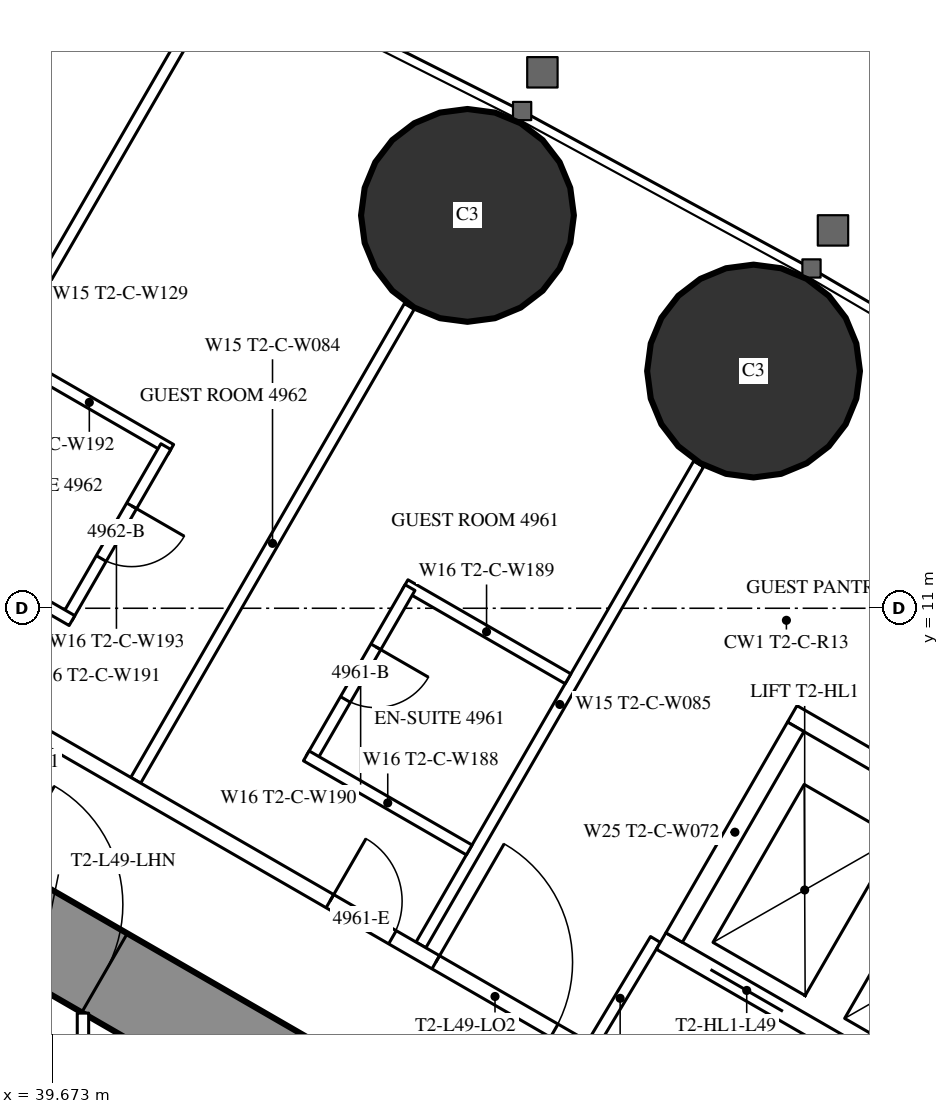
"""IFC4 building model, lengths in metres.
Left out: names, types, materials, properties, quantities, classifications, styles, units other than length and angle.
Written with IfcOpenShell. Run it as: python <this file> out.ifc"""

import sys

from ifc_helpers import new_model, si_unit, direction, frame, frame_2d, origin, origin_2d, place, context, subcontext, project, spatial, rectangle, circle, extrude, element, fill, save


model = new_model("IFC4")
c1 = context("Model", 3, precision=1e-05, world=origin(), true_north=direction((0.0, 1.0)))
c2 = subcontext(c1, "Body", "Model", "MODEL_VIEW")
j1 = project(units=[si_unit("LENGTHUNIT", "METRE"), si_unit("PLANEANGLEUNIT", "RADIAN")], contexts=[c1])
p1 = place(None, origin())
s1 = spatial("IfcSite", under=j1, at=p1, CompositionType="ELEMENT")
p2 = place(p1, origin())
s2 = spatial("IfcBuilding", under=s1, at=p2, CompositionType="ELEMENT")
p3 = place(p2, frame((0.0, 0.0, 184.3)))
s3 = spatial("IfcBuildingStorey", under=s2, at=p3, CompositionType="ELEMENT", Elevation=184.3)
for number, where, z_axis, x_axis in (
    (1, (48.897, 14.121, 0.0), (0.0, 0.0, 1.0), (1.0, 0.0, 0.0)),
    (2, (45.134, 16.168, 0.0), (0.0, 0.0, 1.0), (1.0, 0.0, 0.0)),
):
    element("IfcColumn", number, at=place(p3, frame(where, z_axis=z_axis, x_axis=x_axis)), inside=s3, PredefinedType="COLUMN", context=c2, shape_type="SweptSolid", body=[
        extrude(circle(Radius=1.4, at=origin_2d()), origin(), (0.0, 0.0, 1.0), 3.5),
    ])
p4 = place(p3, frame((27.2, 13.8, 0.0), z_axis=(0.0, 0.0, 1.0), x_axis=(0.866024515034, -0.500001539357, 0.0)))
e3 = element("IfcWall", 3, at=p4, inside=s3, PredefinedType="SHEAR", context=c2, shape_type="SweptSolid", body=[
    extrude(rectangle(XDim=26.907, YDim=1.2, at=frame_2d((13.454, 0.0))), origin(), (0.0, 0.0, 1.0), 3.5),
])
p5 = place(p4, frame((4.6, 0.0, 0.0)))
e4 = element("IfcOpeningElement", 4, at=p5, cuts=e3, PredefinedType="OPENING", context=c2, shape_type="SweptSolid", body=[
    extrude(rectangle(XDim=1.0, YDim=2.2, at=frame_2d((0.5, 1.1))), frame((0.0, 0.61, 0.0), z_axis=(0.0, -1.0, 0.0), x_axis=(1.0, 0.0, 0.0)), (0.0, 0.0, 1.0), 1.22),
])
p6 = place(p4, frame((13.395, 0.0, 0.0)))
e5 = element("IfcOpeningElement", 5, at=p6, cuts=e3, PredefinedType="OPENING", context=c2, shape_type="SweptSolid", body=[
    extrude(rectangle(XDim=1.8, YDim=2.2, at=frame_2d((0.9, 1.1))), frame((0.0, 0.61, 0.0), z_axis=(0.0, -1.0, 0.0), x_axis=(1.0, 0.0, 0.0)), (0.0, 0.0, 1.0), 1.22),
])
p7 = place(p3, frame((37.022, 10.9, 0.0), z_axis=(0.0, 0.0, 1.0), x_axis=(0.499998620953, 0.866026199976, 0.0)))
e6 = element("IfcWall", 6, at=p7, inside=s3, PredefinedType="PARTITIONING", context=c2, shape_type="SweptSolid", body=[
    extrude(rectangle(XDim=9.77, YDim=0.15, at=frame_2d((4.885, 0.0))), origin(), (0.0, 0.0, 1.0), 3.25),
])
p8 = place(p3, frame((40.769, 8.737, 0.0), z_axis=(0.0, 0.0, 1.0), x_axis=(0.500013115284, 0.866017831539, 0.0)))
e7 = element("IfcWall", 7, at=p8, inside=s3, PredefinedType="PARTITIONING", context=c2, shape_type="SweptSolid", body=[
    extrude(rectangle(XDim=7.198, YDim=0.15, at=frame_2d((3.599, 0.0))), origin(), (0.0, 0.0, 1.0), 2.3),
])
p9 = place(p3, frame((44.521, 6.571, 0.0), z_axis=(0.0, 0.0, 1.0), x_axis=(0.500020376429, 0.866013639128, 0.0)))
e8 = element("IfcWall", 8, at=p9, inside=s3, PredefinedType="PARTITIONING", context=c2, shape_type="SweptSolid", body=[
    extrude(rectangle(XDim=7.306, YDim=0.15, at=frame_2d((3.653, 0.0))), origin(), (0.0, 0.0, 1.0), 2.3),
])
p10 = place(p3, frame((27.959, 16.017, 0.0), z_axis=(0.0, 0.0, 1.0), x_axis=(0.866027146794, -0.499996981007, 0.0)))
e9 = element("IfcWall", 9, at=p10, inside=s3, PredefinedType="PARTITIONING", context=c2, shape_type="SweptSolid", body=[
    extrude(rectangle(XDim=21.657, YDim=0.2, at=frame_2d((10.829, 0.0))), origin(), (0.0, 0.0, 1.0), 3.25),
])
p11 = place(p10, frame((17.741, 0.0, 0.0)))
e10 = element("IfcOpeningElement", 10, at=p11, cuts=e9, PredefinedType="OPENING", context=c2, shape_type="SweptSolid", body=[
    extrude(rectangle(XDim=0.95, YDim=2.2, at=frame_2d((0.475, 1.1))), frame((0.0, 0.11, 0.0), z_axis=(0.0, -1.0, 0.0), x_axis=(1.0, 0.0, 0.0)), (0.0, 0.0, 1.0), 0.22),
])
p12 = place(p10, frame((10.782, 0.0, 0.0)))
e11 = element("IfcOpeningElement", 11, at=p12, cuts=e9, PredefinedType="OPENING", context=c2, shape_type="SweptSolid", body=[
    extrude(rectangle(XDim=0.95, YDim=2.2, at=frame_2d((0.475, 1.1))), frame((0.0, 0.11, 0.0), z_axis=(0.0, -1.0, 0.0), x_axis=(1.0, 0.0, 0.0)), (0.0, 0.0, 1.0), 0.22),
])
p13 = place(p10, frame((6.732, 0.0, 0.0)))
e12 = element("IfcOpeningElement", 12, at=p13, cuts=e9, PredefinedType="OPENING", context=c2, shape_type="SweptSolid", body=[
    extrude(rectangle(XDim=0.95, YDim=2.2, at=frame_2d((0.475, 1.1))), frame((0.0, 0.11, 0.0), z_axis=(0.0, -1.0, 0.0), x_axis=(1.0, 0.0, 0.0)), (0.0, 0.0, 1.0), 0.22),
])
p14 = place(p10, frame((19.349, 0.0, 0.0)))
e13 = element("IfcOpeningElement", 13, at=p14, cuts=e9, PredefinedType="OPENING", context=c2, shape_type="SweptSolid", body=[
    extrude(rectangle(XDim=1.8, YDim=2.2, at=frame_2d((0.9, 1.1))), frame((0.0, 0.11, 0.0), z_axis=(0.0, -1.0, 0.0), x_axis=(1.0, 0.0, 0.0)), (0.0, 0.0, 1.0), 0.22),
])
p15 = place(p3, frame((47.606, 6.643, 0.0), z_axis=(0.0, 0.0, 1.0), x_axis=(-0.514237157483, -0.857648031458, 0.0)))
e14 = element("IfcWall", 14, at=p15, inside=s3, PredefinedType="PARTITIONING", context=c2, shape_type="SweptSolid", body=[
    extrude(rectangle(XDim=1.805, YDim=0.15, at=frame_2d((0.902, 0.0))), origin(), (0.0, 0.0, 1.0), 3.25),
])
p16 = place(p3, frame((44.313, 11.31, 0.0), z_axis=(0.0, 0.0, 1.0), x_axis=(0.866031185235, -0.4999899861, 0.0)))
e15 = element("IfcWall", 15, at=p16, inside=s3, PredefinedType="PARTITIONING", context=c2, shape_type="SweptSolid", body=[
    extrude(rectangle(XDim=2.475, YDim=0.15, at=frame_2d((1.238, 0.0))), origin(), (0.0, 0.0, 1.0), 3.25),
])
p17 = place(p3, frame((43.078, 9.021, 0.0), z_axis=(0.0, 0.0, 1.0), x_axis=(0.49997716683, 0.86603858612, 0.0)))
e16 = element("IfcWall", 16, at=p17, inside=s3, PredefinedType="PARTITIONING", context=c2, shape_type="SweptSolid", body=[
    extrude(rectangle(XDim=2.6, YDim=0.15, at=frame_2d((1.3, 0.0))), origin(), (0.0, 0.0, 1.0), 3.25),
])
p18 = place(p17, frame((0.9, 0.0, 0.0)))
e17 = element("IfcOpeningElement", 17, at=p18, cuts=e16, PredefinedType="OPENING", context=c2, shape_type="SweptSolid", body=[
    extrude(rectangle(XDim=0.8, YDim=2.2, at=frame_2d((0.4, 1.1))), frame((0.0, 0.085, 0.0), z_axis=(0.0, -1.0, 0.0), x_axis=(1.0, 0.0, 0.0)), (0.0, 0.0, 1.0), 0.17),
])
p19 = place(p3, frame((43.013, 9.058, 0.0), z_axis=(0.0, 0.0, 1.0), x_axis=(0.866006523861, -0.500032699561, 0.0)))
e18 = element("IfcWall", 18, at=p19, inside=s3, PredefinedType="PARTITIONING", context=c2, shape_type="SweptSolid", body=[
    extrude(rectangle(XDim=2.475, YDim=0.15, at=frame_2d((1.237, 0.0))), origin(), (0.0, 0.0, 1.0), 2.45),
])
p20 = place(p3, frame((39.087, 14.327, 0.0), z_axis=(0.0, 0.0, 1.0), x_axis=(0.866006523861, -0.500032699561, 0.0)))
e19 = element("IfcWall", 19, at=p20, inside=s3, PredefinedType="PARTITIONING", context=c2, shape_type="SweptSolid", body=[
    extrude(rectangle(XDim=2.475, YDim=0.15, at=frame_2d((1.237, 0.0))), origin(), (0.0, 0.0, 1.0), 3.25),
])
p21 = place(p3, frame((39.865, 10.875, 0.0), z_axis=(0.0, 0.0, 1.0), x_axis=(0.500047596559, 0.865997922154, 0.0)))
e20 = element("IfcWall", 20, at=p21, inside=s3, PredefinedType="PARTITIONING", context=c2, shape_type="SweptSolid", body=[
    extrude(rectangle(XDim=2.6, YDim=0.15, at=frame_2d((1.3, 0.0))), origin(), (0.0, 0.0, 1.0), 3.25),
])
p22 = place(p21, frame((0.9, 0.0, 0.0)))
e21 = element("IfcOpeningElement", 21, at=p22, cuts=e20, PredefinedType="OPENING", context=c2, shape_type="SweptSolid", body=[
    extrude(rectangle(XDim=0.8, YDim=2.2, at=frame_2d((0.4, 1.1))), frame((0.0, 0.085, 0.0), z_axis=(0.0, -1.0, 0.0), x_axis=(1.0, 0.0, 0.0)), (0.0, 0.0, 1.0), 0.17),
])
p23 = place(p3, frame((37.787, 12.075, 0.0), z_axis=(0.0, 0.0, 1.0), x_axis=(0.866006523861, -0.500032699561, 0.0)))
e22 = element("IfcWall", 22, at=p23, inside=s3, PredefinedType="PARTITIONING", context=c2, shape_type="SweptSolid", body=[
    extrude(rectangle(XDim=2.475, YDim=0.15, at=frame_2d((1.237, 0.0))), origin(), (0.0, 0.0, 1.0), 3.25),
])
p24 = place(p3, frame((40.075, -1.2, 0.0), z_axis=(0.0, 0.0, 1.0), x_axis=(0.0, 1.0, 0.0)))
e23 = element("IfcWall", 23, at=p24, inside=s3, PredefinedType="PARTITIONING", context=c2, shape_type="SweptSolid", body=[
    extrude(rectangle(XDim=6.874, YDim=0.15, at=frame_2d((3.437, 0.0))), origin(), (0.0, 0.0, 1.0), 3.25),
])
p25 = place(p24, frame((2.537, 0.0, 0.0)))
e24 = element("IfcOpeningElement", 24, at=p25, cuts=e23, PredefinedType="OPENING", context=c2, shape_type="SweptSolid", body=[
    extrude(rectangle(XDim=1.8, YDim=2.2, at=frame_2d((0.9, 1.1))), frame((0.0, 0.085, 0.0), z_axis=(0.0, -1.0, 0.0), x_axis=(1.0, 0.0, 0.0)), (0.0, 0.0, 1.0), 0.17),
])
p26 = place(p3, frame((47.681, 6.622, 0.0), z_axis=(0.0, 0.0, 1.0), x_axis=(0.86603344179, -0.499986077507, 0.0)))
e25 = element("IfcWall", 25, at=p26, inside=s3, PredefinedType="PARTITIONING", context=c2, shape_type="SweptSolid", body=[
    extrude(rectangle(XDim=6.6, YDim=0.25, at=frame_2d((3.3, 0.0))), origin(), (0.0, 0.0, 1.0), 3.25),
])
p27 = place(p26, frame((0.75, 0.0, 0.0)))
e26 = element("IfcOpeningElement", 26, at=p27, cuts=e25, PredefinedType="OPENING", context=c2, shape_type="SweptSolid", body=[
    extrude(rectangle(XDim=1.1, YDim=2.2, at=frame_2d((0.55, 1.1))), frame((0.0, 0.135, 0.0), z_axis=(0.0, -1.0, 0.0), x_axis=(1.0, 0.0, 0.0)), (0.0, 0.0, 1.0), 0.27),
])
p28 = place(p26, frame((2.75, 0.0, 0.0)))
e27 = element("IfcOpeningElement", 27, at=p28, cuts=e25, PredefinedType="OPENING", context=c2, shape_type="SweptSolid", body=[
    extrude(rectangle(XDim=1.1, YDim=2.2, at=frame_2d((0.55, 1.1))), frame((0.0, 0.135, 0.0), z_axis=(0.0, -1.0, 0.0), x_axis=(1.0, 0.0, 0.0)), (0.0, 0.0, 1.0), 0.27),
])
p29 = place(p26, frame((4.75, 0.0, 0.0)))
e28 = element("IfcOpeningElement", 28, at=p29, cuts=e25, PredefinedType="OPENING", context=c2, shape_type="SweptSolid", body=[
    extrude(rectangle(XDim=1.1, YDim=2.2, at=frame_2d((0.55, 1.1))), frame((0.0, 0.135, 0.0), z_axis=(0.0, -1.0, 0.0), x_axis=(1.0, 0.0, 0.0)), (0.0, 0.0, 1.0), 0.27),
])
p30 = place(p3, frame((49.406, 9.611, 0.0), z_axis=(0.0, 0.0, 1.0), x_axis=(0.86603344179, -0.499986077507, 0.0)))
e29 = element("IfcWall", 29, at=p30, inside=s3, PredefinedType="PARTITIONING", context=c2, shape_type="SweptSolid", body=[
    extrude(rectangle(XDim=6.6, YDim=0.25, at=frame_2d((3.3, 0.0))), origin(), (0.0, 0.0, 1.0), 3.25),
])
p31 = place(p3, frame((47.852, 6.668, 0.0), z_axis=(0.0, 0.0, 1.0), x_axis=(0.499929347863, 0.866066190972, 0.0)))
e30 = element("IfcWall", 30, at=p31, inside=s3, PredefinedType="PARTITIONING", context=c2, shape_type="SweptSolid", body=[
    extrude(rectangle(XDim=3.201, YDim=0.25, at=frame_2d((1.6, 0.0))), origin(), (0.0, 0.0, 1.0), 3.25),
])
p32 = place(p18, origin())
e31 = element("IfcDoor", 31, at=p32, inside=s3, OperationType="SINGLE_SWING_RIGHT", PredefinedType="DOOR", context=c2, shape_type="SweptSolid", body=[
    extrude(rectangle(XDim=0.8, YDim=2.2, at=frame_2d((0.4, 1.1))), frame((0.0, 0.025, 0.0), z_axis=(0.0, -1.0, 0.0), x_axis=(1.0, 0.0, 0.0)), (0.0, 0.0, 1.0), 0.05),
])
fill(e17, e31)
p33 = place(p11, origin())
e32 = element("IfcDoor", 32, at=p33, inside=s3, OperationType="SINGLE_SWING_LEFT", PredefinedType="DOOR", context=c2, shape_type="SweptSolid", body=[
    extrude(rectangle(XDim=0.95, YDim=2.2, at=frame_2d((0.475, 1.1))), frame((0.0, 0.025, 0.0), z_axis=(0.0, -1.0, 0.0), x_axis=(1.0, 0.0, 0.0)), (0.0, 0.0, 1.0), 0.05),
])
fill(e10, e32)
p34 = place(p22, origin())
e33 = element("IfcDoor", 33, at=p34, inside=s3, OperationType="SINGLE_SWING_RIGHT", PredefinedType="DOOR", context=c2, shape_type="SweptSolid", body=[
    extrude(rectangle(XDim=0.8, YDim=2.2, at=frame_2d((0.4, 1.1))), frame((0.0, 0.025, 0.0), z_axis=(0.0, -1.0, 0.0), x_axis=(1.0, 0.0, 0.0)), (0.0, 0.0, 1.0), 0.05),
])
fill(e21, e33)
p35 = place(p14, origin())
e34 = element("IfcDoor", 34, at=p35, inside=s3, OperationType="DOUBLE_DOOR_SINGLE_SWING", PredefinedType="DOOR", context=c2, shape_type="SweptSolid", body=[
    extrude(rectangle(XDim=1.8, YDim=2.2, at=frame_2d((0.9, 1.1))), frame((0.0, 0.025, 0.0), z_axis=(0.0, -1.0, 0.0), x_axis=(1.0, 0.0, 0.0)), (0.0, 0.0, 1.0), 0.05),
])
fill(e13, e34)
p36 = place(p6, origin())
e35 = element("IfcDoor", 35, at=p36, inside=s3, OperationType="DOUBLE_DOOR_SINGLE_SWING", PredefinedType="DOOR", context=c2, shape_type="SweptSolid", body=[
    extrude(rectangle(XDim=1.8, YDim=2.2, at=frame_2d((0.9, 1.1))), frame((0.0, 0.025, 0.0), z_axis=(0.0, -1.0, 0.0), x_axis=(1.0, 0.0, 0.0)), (0.0, 0.0, 1.0), 0.05),
])
fill(e5, e35)
p37 = place(p27, origin())
e36 = element("IfcDoor", 36, at=p37, inside=s3, OperationType="DOUBLE_DOOR_SLIDING", PredefinedType="USERDEFINED", context=c2, shape_type="SweptSolid", body=[
    extrude(rectangle(XDim=1.1, YDim=2.2, at=frame_2d((0.55, 1.1))), frame((0.0, 0.025, 0.0), z_axis=(0.0, -1.0, 0.0), x_axis=(1.0, 0.0, 0.0)), (0.0, 0.0, 1.0), 0.05),
])
fill(e26, e36)
save(model, sys.argv[1])
